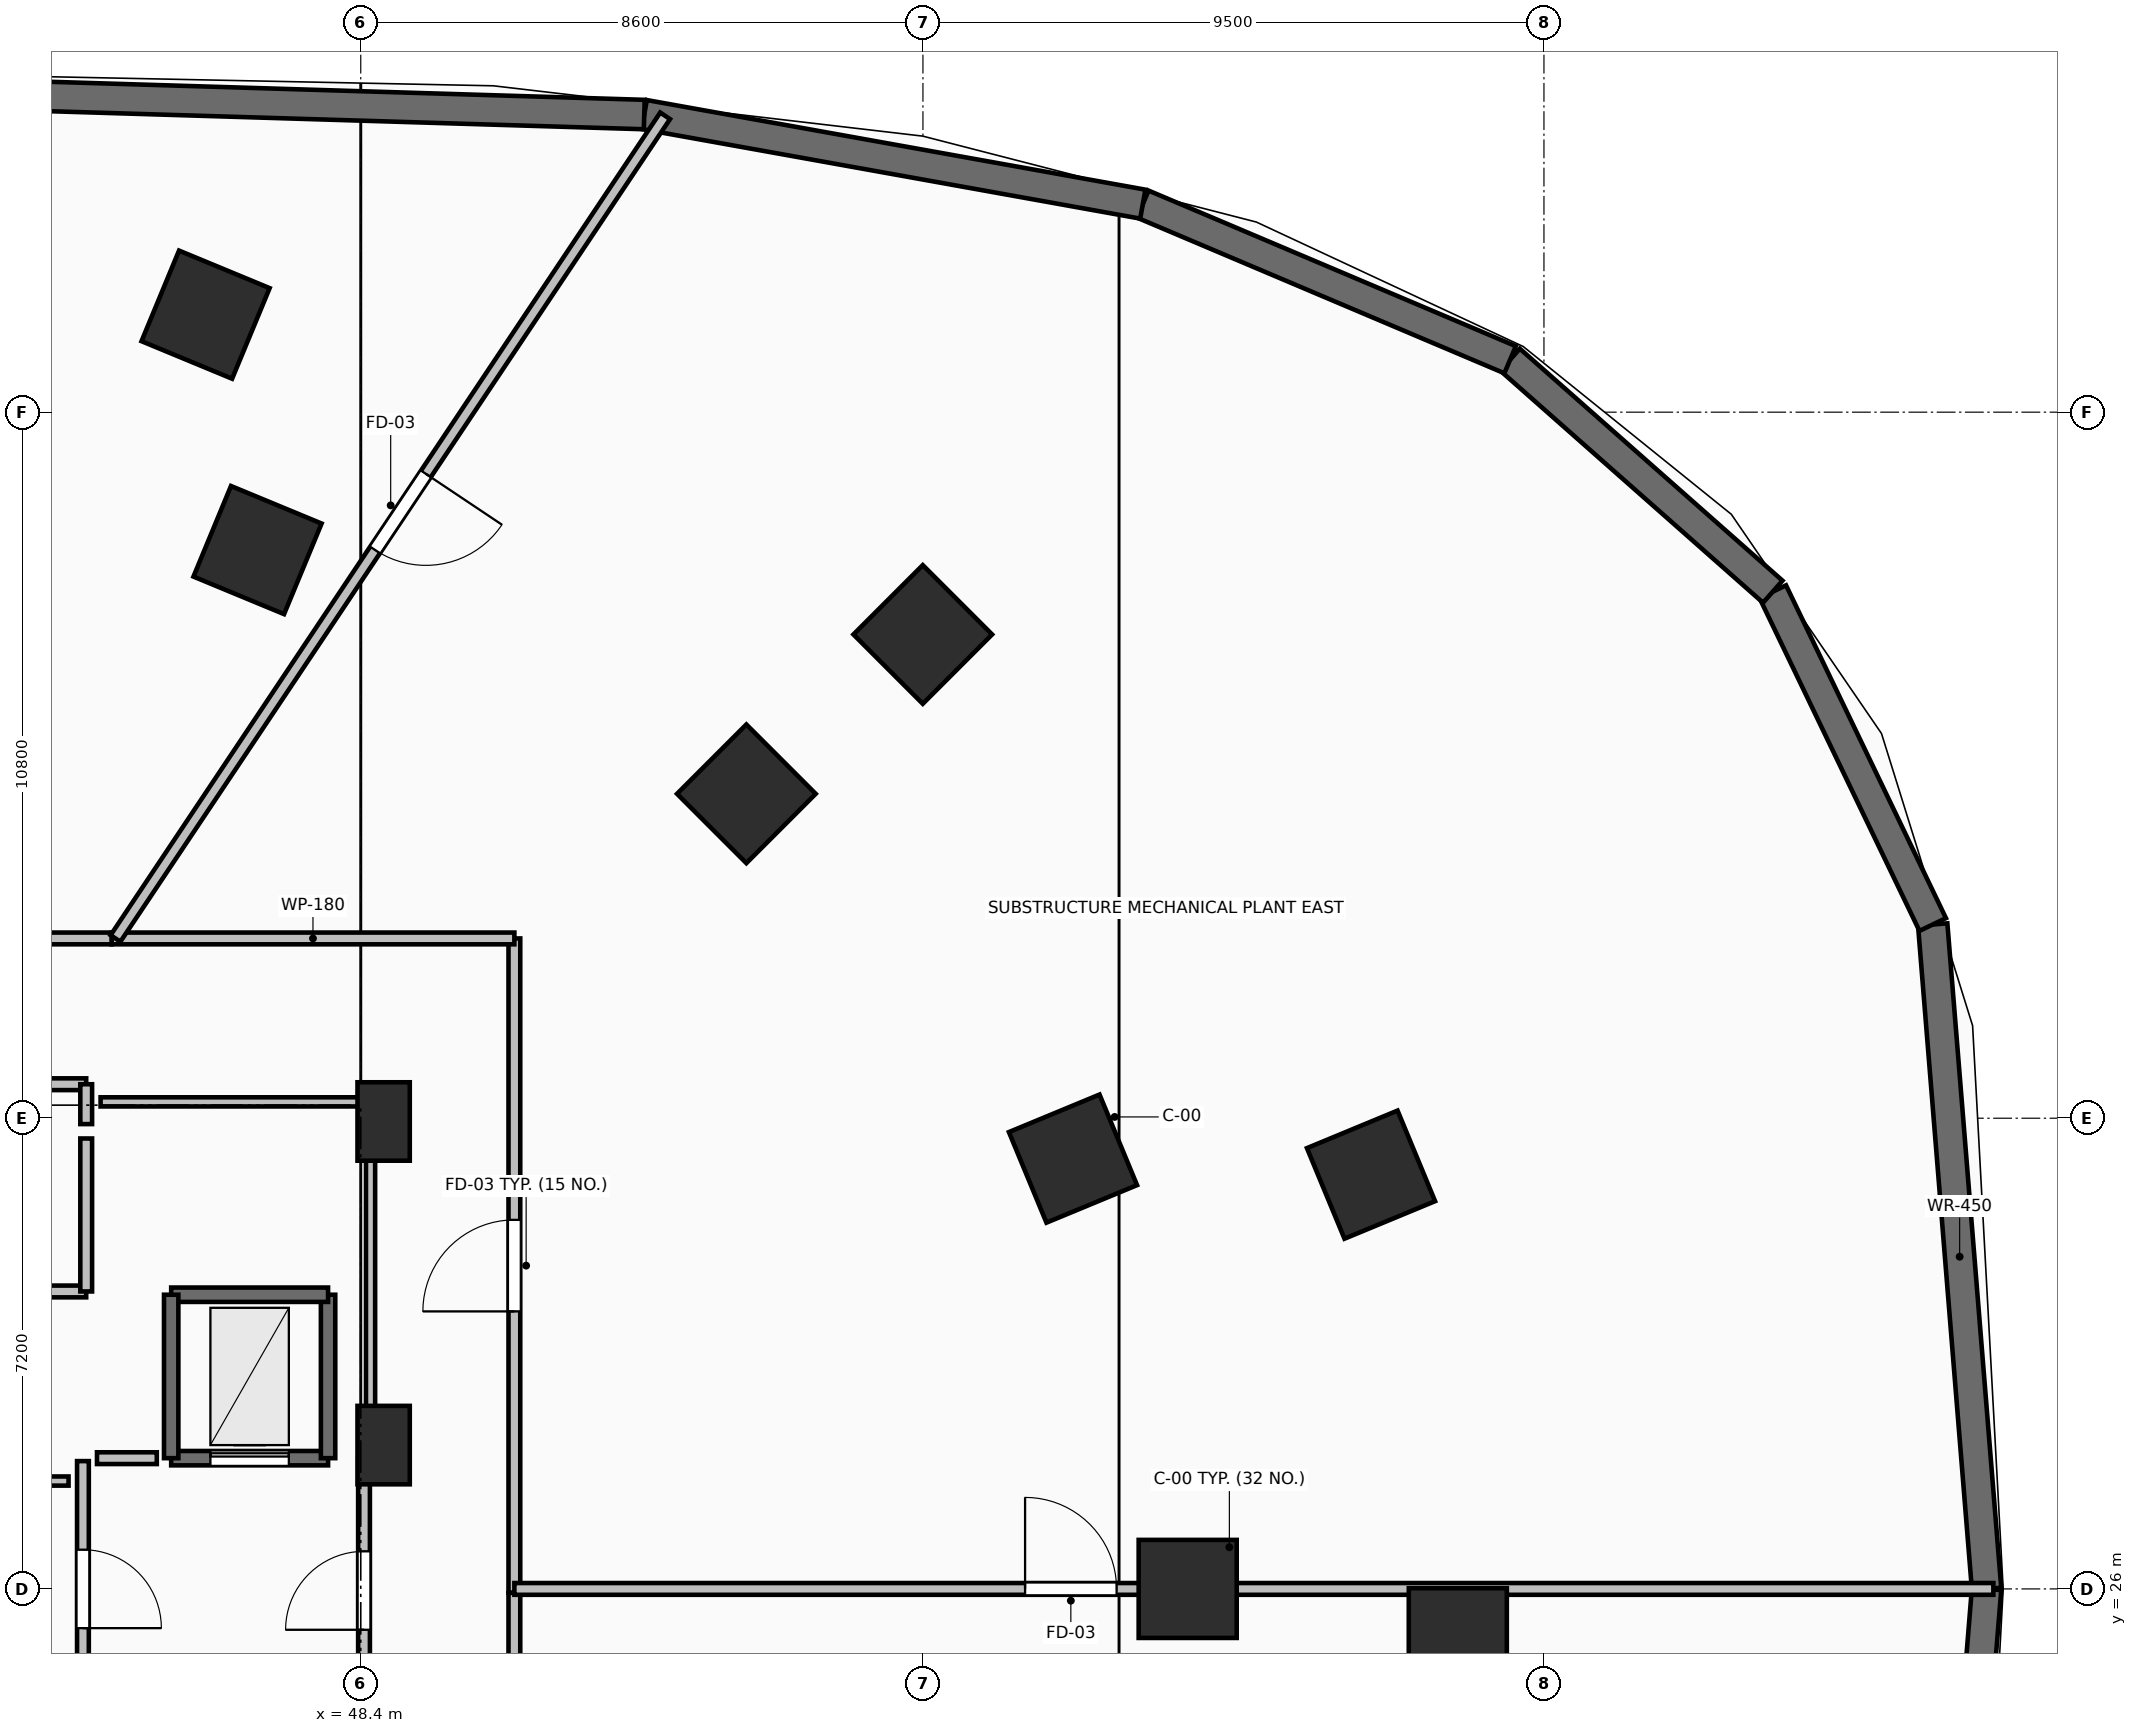
"""IFC4 building model, lengths in metres.
Left out: names, types, materials, properties, quantities, classifications, styles, units other than length and angle.
Written with IfcOpenShell. Run it as: python <this file> out.ifc"""

import sys

from ifc_helpers import new_model, si_unit, direction, frame, frame_2d, origin, origin_2d, place, context, subcontext, project, spatial, rectangle, extrude, element, fill, save


model = new_model("IFC4")
c1 = context("Model", 3, precision=1e-05, world=origin(), true_north=direction((0.0, 1.0)))
c2 = subcontext(c1, "Body", "Model", "MODEL_VIEW")
j1 = project(units=[si_unit("LENGTHUNIT", "METRE"), si_unit("PLANEANGLEUNIT", "RADIAN")], contexts=[c1])
p1 = place(None, origin())
s1 = spatial("IfcSite", under=j1, at=p1, CompositionType="ELEMENT")
p2 = place(p1, origin())
s2 = spatial("IfcBuilding", under=s1, at=p2, CompositionType="ELEMENT")
p3 = place(p2, frame((0.0, 0.0, -9.6)))
s3 = spatial("IfcBuildingStorey", under=s2, at=p3, CompositionType="ELEMENT", Elevation=-9.6)
for number, where, z_axis, x_axis in (
    (1, (61.05, 26.0, 0.0), (0.0, 0.0, 1.0), (1.0, 0.0, 0.0)),
    (2, (59.295, 32.582, 0.0), (0.0, 0.0, 1.0), (0.924, 0.383, 0.0)),
    (3, (54.299, 38.162, 0.0), (0.0, 0.0, 1.0), (0.707, 0.707, 0.0)),
    (4, (46.821, 41.891, 0.0), (0.0, 0.0, 1.0), (0.383, 0.924, 0.0)),
    (5, (65.182, 25.261, 0.0), (0.0, 0.0, 1.0), (1.0, 0.0, 0.0)),
    (6, (63.854, 32.337, 0.0), (0.0, 0.0, 1.0), (0.924, 0.383, 0.0)),
    (7, (56.997, 40.6, 0.0), (0.0, 0.0, 1.0), (0.707, 0.707, 0.0)),
    (8, (46.026, 45.492, 0.0), (0.0, 0.0, 1.0), (0.383, 0.924, 0.0)),
):
    element("IfcColumn", number, at=place(p3, frame(where, z_axis=z_axis, x_axis=x_axis)), inside=s3, PredefinedType="COLUMN", context=c2, shape_type="SweptSolid", body=[
        extrude(rectangle(XDim=1.5, YDim=1.5, at=origin_2d()), origin(), (0.0, 0.0, 1.0), 4.8),
    ])
for number, where, z_axis, x_axis in (
    (9, (48.75, 33.15, 0.0), (0.0, 0.0, 1.0), (1.0, 0.0, 0.0)),
    (10, (48.75, 28.2, 0.0), (0.0, 0.0, 1.0), (1.0, 0.0, 0.0)),
):
    element("IfcColumn", number, at=place(p3, frame(where, z_axis=z_axis, x_axis=x_axis)), inside=s3, PredefinedType="PILASTER", context=c2, shape_type="SweptSolid", body=[
        extrude(rectangle(XDim=0.8, YDim=1.2, at=origin_2d()), origin(), (0.0, 0.0, 1.0), 4.8),
    ])
p4 = place(p3, frame((73.271, 26.0, 0.0), z_axis=(0.0, 0.0, 1.0), x_axis=(-0.080835799126, 0.996727431939, 0.0)))
e11 = element("IfcWall", 11, at=p4, inside=s3, PredefinedType="SOLIDWALL", context=c2, shape_type="SweptSolid", body=[
    extrude(rectangle(XDim=10.196, YDim=0.45, at=frame_2d((5.098, 0.0))), origin(), (0.0, 0.0, 1.0), 4.45),
])
p5 = place(p3, frame((72.447, 36.163, 0.0), z_axis=(0.0, 0.0, 1.0), x_axis=(-0.433120243411, 0.901336149695, 0.0)))
e12 = element("IfcWall", 12, at=p5, inside=s3, PredefinedType="SOLIDWALL", context=c2, shape_type="SweptSolid", body=[
    extrude(rectangle(XDim=5.649, YDim=0.45, at=frame_2d((2.824, 0.0))), origin(), (0.0, 0.0, 1.0), 4.45),
])
p6 = place(p3, frame((70.0, 41.254, 0.0), z_axis=(0.0, 0.0, 1.0), x_axis=(-0.749561336725, 0.661934892937, 0.0)))
e13 = element("IfcWall", 13, at=p6, inside=s3, PredefinedType="SOLIDWALL", context=c2, shape_type="SweptSolid", body=[
    extrude(rectangle(XDim=5.361, YDim=0.45, at=frame_2d((2.68, 0.0))), origin(), (0.0, 0.0, 1.0), 4.45),
])
p7 = place(p3, frame((65.982, 44.802, 0.0), z_axis=(0.0, 0.0, 1.0), x_axis=(-0.92081090532, 0.390009328919, 0.0)))
e14 = element("IfcWall", 14, at=p7, inside=s3, PredefinedType="SOLIDWALL", context=c2, shape_type="SweptSolid", body=[
    extrude(rectangle(XDim=6.102, YDim=0.45, at=frame_2d((3.051, 0.0))), origin(), (0.0, 0.0, 1.0), 4.45),
])
p8 = place(p3, frame((60.364, 47.182, 0.0), z_axis=(0.0, 0.0, 1.0), x_axis=(-0.984238318617, 0.176847200051, 0.0)))
e15 = element("IfcWall", 15, at=p8, inside=s3, PredefinedType="SOLIDWALL", context=c2, shape_type="SweptSolid", body=[
    extrude(rectangle(XDim=7.749, YDim=0.45, at=frame_2d((3.875, 0.0))), origin(), (0.0, 0.0, 1.0), 4.45),
])
p9 = place(p3, frame((52.737, 48.553, 0.0), z_axis=(0.0, 0.0, 1.0), x_axis=(-0.999540251976, 0.030319707786, 0.0)))
e16 = element("IfcWall", 16, at=p9, inside=s3, PredefinedType="SOLIDWALL", context=c2, shape_type="SweptSolid", body=[
    extrude(rectangle(XDim=14.744, YDim=0.45, at=frame_2d((7.372, 0.0))), origin(), (0.0, 0.0, 1.0), 4.45),
])
p10 = place(p3, frame((72.447, 15.837, 0.0), z_axis=(0.0, 0.0, 1.0), x_axis=(0.080835799126, 0.996727431939, 0.0)))
e17 = element("IfcWall", 17, at=p10, inside=s3, PredefinedType="SOLIDWALL", context=c2, shape_type="SweptSolid", body=[
    extrude(rectangle(XDim=10.196, YDim=0.45, at=frame_2d((5.098, 0.0))), origin(), (0.0, 0.0, 1.0), 4.45),
])
p11 = place(p3, frame((45.5, 28.0, 0.0), z_axis=(0.0, 0.0, 1.0), x_axis=(1.0, 0.0, 0.0)))
e18 = element("IfcWall", 18, at=p11, inside=s3, PredefinedType="SHEAR", context=c2, shape_type="SweptSolid", body=[
    extrude(rectangle(XDim=2.4, YDim=0.22, at=frame_2d((1.2, 0.0))), origin(), (0.0, 0.0, 1.0), 4.45),
])
p12 = place(p11, frame((0.6, 0.0, 0.0)))
e19 = element("IfcOpeningElement", 19, at=p12, cuts=e18, PredefinedType="OPENING", context=c2, shape_type="SweptSolid", body=[
    extrude(rectangle(XDim=1.2, YDim=2.2, at=frame_2d((0.6, 1.1))), frame((0.0, 0.125, 0.0), z_axis=(0.0, -1.0, 0.0), x_axis=(1.0, 0.0, 0.0)), (0.0, 0.0, 1.0), 0.25),
])
p13 = place(p3, frame((47.9, 28.0, 0.0), z_axis=(0.0, 0.0, 1.0), x_axis=(0.0, 1.0, 0.0)))
e20 = element("IfcWall", 20, at=p13, inside=s3, PredefinedType="SHEAR", context=c2, shape_type="SweptSolid", body=[
    extrude(rectangle(XDim=2.5, YDim=0.22, at=frame_2d((1.25, 0.0))), origin(), (0.0, 0.0, 1.0), 4.45),
])
p14 = place(p3, frame((47.9, 30.5, 0.0), z_axis=(0.0, 0.0, 1.0), x_axis=(-1.0, 0.0, 0.0)))
e21 = element("IfcWall", 21, at=p14, inside=s3, PredefinedType="SHEAR", context=c2, shape_type="SweptSolid", body=[
    extrude(rectangle(XDim=2.4, YDim=0.22, at=frame_2d((1.2, 0.0))), origin(), (0.0, 0.0, 1.0), 4.45),
])
p15 = place(p3, frame((45.5, 30.5, 0.0), z_axis=(0.0, 0.0, 1.0), x_axis=(0.0, -1.0, 0.0)))
e22 = element("IfcWall", 22, at=p15, inside=s3, PredefinedType="SHEAR", context=c2, shape_type="SweptSolid", body=[
    extrude(rectangle(XDim=2.5, YDim=0.22, at=frame_2d((1.25, 0.0))), origin(), (0.0, 0.0, 1.0), 4.45),
])
p16 = place(p3, frame((44.15, 27.955, 0.0), z_axis=(0.0, 0.0, 1.0), x_axis=(0.0, -1.0, 0.0)))
e23 = element("IfcWall", 23, at=p16, inside=s3, PredefinedType="PARTITIONING", context=c2, shape_type="SweptSolid", body=[
    extrude(rectangle(XDim=3.91, YDim=0.18, at=frame_2d((1.955, 0.0))), origin(), (0.0, 0.0, 1.0), 4.45),
])
p17 = place(p16, frame((1.355, 0.0, 0.0)))
e24 = element("IfcOpeningElement", 24, at=p17, cuts=e23, PredefinedType="OPENING", context=c2, shape_type="SweptSolid", body=[
    extrude(rectangle(XDim=1.2, YDim=2.15, at=frame_2d((0.6, 1.075))), frame((0.0, 0.105, 0.0), z_axis=(0.0, -1.0, 0.0), x_axis=(1.0, 0.0, 0.0)), (0.0, 0.0, 1.0), 0.21),
])
p18 = place(p3, frame((48.45, 23.95, 0.0), z_axis=(0.0, 0.0, 1.0), x_axis=(0.0, 1.0, 0.0)))
e25 = element("IfcWall", 25, at=p18, inside=s3, PredefinedType="PARTITIONING", context=c2, shape_type="SweptSolid", body=[
    extrude(rectangle(XDim=4.05, YDim=0.18, at=frame_2d((2.025, 0.0))), origin(), (0.0, 0.0, 1.0), 3.03),
])
p19 = place(p18, frame((1.425, 0.0, 0.0)))
e26 = element("IfcOpeningElement", 26, at=p19, cuts=e25, PredefinedType="OPENING", context=c2, shape_type="SweptSolid", body=[
    extrude(rectangle(XDim=1.2, YDim=2.15, at=frame_2d((0.6, 1.075))), frame((0.0, 0.105, 0.0), z_axis=(0.0, -1.0, 0.0), x_axis=(1.0, 0.0, 0.0)), (0.0, 0.0, 1.0), 0.21),
])
p20 = place(p3, frame((44.2, 33.72, 0.0), z_axis=(0.0, 0.0, 1.0), x_axis=(-1.0, 0.0, 0.0)))
e27 = element("IfcWall", 27, at=p20, inside=s3, PredefinedType="PARTITIONING", context=c2, shape_type="SweptSolid", body=[
    extrude(rectangle(XDim=5.25, YDim=0.18, at=frame_2d((2.625, 0.0))), origin(), (0.0, 0.0, 1.0), 4.45),
])
p21 = place(p20, frame((1.925, 0.0, 0.0)))
e28 = element("IfcOpeningElement", 28, at=p21, cuts=e27, PredefinedType="OPENING", context=c2, shape_type="SweptSolid", body=[
    extrude(rectangle(XDim=1.4, YDim=2.2, at=frame_2d((0.7, 1.1))), frame((0.0, 0.105, 0.0), z_axis=(0.0, -1.0, 0.0), x_axis=(1.0, 0.0, 0.0)), (0.0, 0.0, 1.0), 0.21),
])
p22 = place(p3, frame((44.2, 33.11, 0.0), z_axis=(0.0, 0.0, 1.0), x_axis=(0.0, 1.0, 0.0)))
e29 = element("IfcWall", 29, at=p22, inside=s3, PredefinedType="PARTITIONING", context=c2, shape_type="SweptSolid", body=[
    extrude(rectangle(XDim=0.61, YDim=0.18, at=frame_2d((0.305, 0.0))), origin(), (0.0, 0.0, 1.0), 4.45),
])
p23 = place(p3, frame((50.75, 25.94, 0.0), z_axis=(0.0, 0.0, 1.0), x_axis=(0.0, 1.0, 0.0)))
e30 = element("IfcWall", 30, at=p23, inside=s3, PredefinedType="PARTITIONING", context=c2, shape_type="SweptSolid", body=[
    extrude(rectangle(XDim=10.01, YDim=0.18, at=frame_2d((5.005, 0.0))), origin(), (0.0, 0.0, 1.0), 3.642),
])
p24 = place(p23, frame((4.305, 0.0, 0.0)))
e31 = element("IfcOpeningElement", 31, at=p24, cuts=e30, PredefinedType="OPENING", context=c2, shape_type="SweptSolid", body=[
    extrude(rectangle(XDim=1.4, YDim=2.2, at=frame_2d((0.7, 1.1))), frame((0.0, 0.105, 0.0), z_axis=(0.0, -1.0, 0.0), x_axis=(1.0, 0.0, 0.0)), (0.0, 0.0, 1.0), 0.21),
])
p25 = place(p3, frame((50.75, 35.95, 0.0), z_axis=(0.0, 0.0, 1.0), x_axis=(-1.0, 0.0, 0.0)))
e32 = element("IfcWall", 32, at=p25, inside=s3, PredefinedType="PARTITIONING", context=c2, shape_type="SweptSolid", body=[
    extrude(rectangle(XDim=6.162, YDim=0.18, at=frame_2d((3.081, 0.0))), origin(), (0.0, 0.0, 1.0), 3.642),
])
p26 = place(p3, frame((44.588, 35.95, 0.0), z_axis=(0.0, 0.0, 1.0), x_axis=(-1.0, 0.0, 0.0)))
e33 = element("IfcWall", 33, at=p26, inside=s3, PredefinedType="PARTITIONING", context=c2, shape_type="SweptSolid", body=[
    extrude(rectangle(XDim=19.338, YDim=0.18, at=frame_2d((9.669, 0.0))), origin(), (0.0, 0.0, 1.0), 3.642),
])
p27 = place(p26, frame((7.289, 0.0, 0.0)))
e34 = element("IfcOpeningElement", 34, at=p27, cuts=e33, PredefinedType="OPENING", context=c2, shape_type="SweptSolid", body=[
    extrude(rectangle(XDim=1.4, YDim=2.2, at=frame_2d((0.7, 1.1))), frame((0.0, 0.105, 0.0), z_axis=(0.0, -1.0, 0.0), x_axis=(1.0, 0.0, 0.0)), (0.0, 0.0, 1.0), 0.21),
])
p28 = place(p3, frame((50.75, 14.1, 0.0), z_axis=(0.0, 0.0, 1.0), x_axis=(0.0, 1.0, 0.0)))
e35 = element("IfcWall", 35, at=p28, inside=s3, PredefinedType="PARTITIONING", context=c2, shape_type="SweptSolid", body=[
    extrude(rectangle(XDim=11.84, YDim=0.18, at=frame_2d((5.92, 0.0))), origin(), (0.0, 0.0, 1.0), 3.642),
])
p29 = place(p28, frame((5.22, 0.0, 0.0)))
e36 = element("IfcOpeningElement", 36, at=p29, cuts=e35, PredefinedType="OPENING", context=c2, shape_type="SweptSolid", body=[
    extrude(rectangle(XDim=1.4, YDim=2.2, at=frame_2d((0.7, 1.1))), frame((0.0, 0.105, 0.0), z_axis=(0.0, -1.0, 0.0), x_axis=(1.0, 0.0, 0.0)), (0.0, 0.0, 1.0), 0.21),
])
p30 = place(p3, frame((53.056, 48.533, 0.0), z_axis=(0.0, 0.0, 1.0), x_axis=(-0.555582200118, -0.831461616019, 0.0)))
e37 = element("IfcWall", 37, at=p30, inside=s3, PredefinedType="PARTITIONING", context=c2, shape_type="SweptSolid", body=[
    extrude(rectangle(XDim=15.134, YDim=0.18, at=frame_2d((7.567, 0.0))), origin(), (0.0, 0.0, 1.0), 3.642),
])
p31 = place(p30, frame((6.587, 0.0, 0.0)))
e38 = element("IfcOpeningElement", 38, at=p31, cuts=e37, PredefinedType="OPENING", context=c2, shape_type="SweptSolid", body=[
    extrude(rectangle(XDim=1.4, YDim=2.2, at=frame_2d((0.7, 1.1))), frame((0.0, 0.105, 0.0), z_axis=(0.0, -1.0, 0.0), x_axis=(1.0, 0.0, 0.0)), (0.0, 0.0, 1.0), 0.21),
])
p32 = place(p3, frame((50.75, 26.0, 0.0), z_axis=(0.0, 0.0, 1.0), x_axis=(1.0, 0.0, 0.0)))
e39 = element("IfcWall", 39, at=p32, inside=s3, PredefinedType="PARTITIONING", context=c2, shape_type="SweptSolid", body=[
    extrude(rectangle(XDim=22.625, YDim=0.18, at=frame_2d((11.312, 0.0))), origin(), (0.0, 0.0, 1.0), 3.642),
])
p33 = place(p32, frame((7.812, 0.0, 0.0)))
e40 = element("IfcOpeningElement", 40, at=p33, cuts=e39, PredefinedType="OPENING", context=c2, shape_type="SweptSolid", body=[
    extrude(rectangle(XDim=1.4, YDim=2.2, at=frame_2d((0.7, 1.1))), frame((0.0, 0.105, 0.0), z_axis=(0.0, -1.0, 0.0), x_axis=(1.0, 0.0, 0.0)), (0.0, 0.0, 1.0), 0.21),
])
p34 = place(p3, frame((45.28, 28.0, 0.0), z_axis=(0.0, 0.0, 1.0), x_axis=(-1.0, 0.0, 0.0)))
e41 = element("IfcWall", 41, at=p34, inside=s3, PredefinedType="PARTITIONING", context=c2, shape_type="SweptSolid", body=[
    extrude(rectangle(XDim=0.915, YDim=0.18, at=frame_2d((0.458, 0.0))), origin(), (0.0, 0.0, 1.0), 4.45),
])
p35 = place(p3, frame((43.93, 27.65, 0.0), z_axis=(0.0, 0.0, 1.0), x_axis=(-1.0, 0.0, 0.0)))
e42 = element("IfcWall", 42, at=p35, inside=s3, PredefinedType="PARTITIONING", context=c2, shape_type="SweptSolid", body=[
    extrude(rectangle(XDim=11.86, YDim=0.14, at=frame_2d((5.93, 0.0))), origin(), (0.0, 0.0, 1.0), 4.45),
])
p36 = place(p3, frame((39.03, 30.55, 0.0), z_axis=(0.0, 0.0, 1.0), x_axis=(1.0, 0.0, 0.0)))
e43 = element("IfcWall", 43, at=p36, inside=s3, PredefinedType="PARTITIONING", context=c2, shape_type="SweptSolid", body=[
    extrude(rectangle(XDim=5.17, YDim=0.18, at=frame_2d((2.585, 0.0))), origin(), (0.0, 0.0, 1.0), 3.03),
])
p37 = place(p3, frame((44.2, 30.55, 0.0), z_axis=(0.0, 0.0, 1.0), x_axis=(0.0, 1.0, 0.0)))
e44 = element("IfcWall", 44, at=p37, inside=s3, PredefinedType="PARTITIONING", context=c2, shape_type="SweptSolid", body=[
    extrude(rectangle(XDim=2.34, YDim=0.18, at=frame_2d((1.17, 0.0))), origin(), (0.0, 0.0, 1.0), 4.45),
])
p38 = place(p3, frame((44.42, 33.45, 0.0), z_axis=(0.0, 0.0, 1.0), x_axis=(1.0, 0.0, 0.0)))
e45 = element("IfcWall", 45, at=p38, inside=s3, PredefinedType="PARTITIONING", context=c2, shape_type="SweptSolid", body=[
    extrude(rectangle(XDim=4.13, YDim=0.14, at=frame_2d((2.065, 0.0))), origin(), (0.0, 0.0, 1.0), 3.642),
])
p39 = place(p3, frame((48.55, 33.45, 0.0), z_axis=(0.0, 0.0, 1.0), x_axis=(0.0, -1.0, 0.0)))
e46 = element("IfcWall", 46, at=p39, inside=s3, PredefinedType="PARTITIONING", context=c2, shape_type="SweptSolid", body=[
    extrude(rectangle(XDim=5.254, YDim=0.14, at=frame_2d((2.627, 0.0))), origin(), (0.0, 0.0, 1.0), 3.03),
])
p40 = place(p12, origin())
e47 = element("IfcDoor", 47, at=p40, inside=s3, OperationType="SLIDING_TO_LEFT", PredefinedType="DOOR", context=c2, shape_type="SweptSolid", body=[
    extrude(rectangle(XDim=1.2, YDim=2.2, at=frame_2d((0.6, 1.1))), frame((0.0, 0.025, 0.0), z_axis=(0.0, -1.0, 0.0), x_axis=(1.0, 0.0, 0.0)), (0.0, 0.0, 1.0), 0.05),
])
fill(e19, e47)
p41 = place(p17, origin())
e48 = element("IfcDoor", 48, at=p41, inside=s3, OperationType="SINGLE_SWING_RIGHT", PredefinedType="DOOR", context=c2, shape_type="SweptSolid", body=[
    extrude(rectangle(XDim=1.2, YDim=2.15, at=frame_2d((0.6, 1.075))), frame((0.0, 0.025, 0.0), z_axis=(0.0, -1.0, 0.0), x_axis=(1.0, 0.0, 0.0)), (0.0, 0.0, 1.0), 0.05),
])
fill(e24, e48)
p42 = place(p19, origin())
e49 = element("IfcDoor", 49, at=p42, inside=s3, OperationType="SINGLE_SWING_LEFT", PredefinedType="DOOR", context=c2, shape_type="SweptSolid", body=[
    extrude(rectangle(XDim=1.2, YDim=2.15, at=frame_2d((0.6, 1.075))), frame((0.0, 0.025, 0.0), z_axis=(0.0, -1.0, 0.0), x_axis=(1.0, 0.0, 0.0)), (0.0, 0.0, 1.0), 0.05),
])
fill(e26, e49)
p43 = place(p24, origin())
e50 = element("IfcDoor", 50, at=p43, inside=s3, OperationType="DOUBLE_SWING_LEFT", PredefinedType="DOOR", context=c2, shape_type="SweptSolid", body=[
    extrude(rectangle(XDim=1.4, YDim=2.2, at=frame_2d((0.7, 1.1))), frame((0.0, 0.025, 0.0), z_axis=(0.0, -1.0, 0.0), x_axis=(1.0, 0.0, 0.0)), (0.0, 0.0, 1.0), 0.05),
])
fill(e31, e50)
p44 = place(p31, origin())
e51 = element("IfcDoor", 51, at=p44, inside=s3, OperationType="DOUBLE_SWING_LEFT", PredefinedType="DOOR", context=c2, shape_type="SweptSolid", body=[
    extrude(rectangle(XDim=1.4, YDim=2.2, at=frame_2d((0.7, 1.1))), frame((0.0, 0.025, 0.0), z_axis=(0.0, -1.0, 0.0), x_axis=(1.0, 0.0, 0.0)), (0.0, 0.0, 1.0), 0.05),
])
fill(e38, e51)
p45 = place(p33, origin())
e52 = element("IfcDoor", 52, at=p45, inside=s3, OperationType="DOUBLE_SWING_LEFT", PredefinedType="DOOR", context=c2, shape_type="SweptSolid", body=[
    extrude(rectangle(XDim=1.4, YDim=2.2, at=frame_2d((0.7, 1.1))), frame((0.0, 0.025, 0.0), z_axis=(0.0, -1.0, 0.0), x_axis=(1.0, 0.0, 0.0)), (0.0, 0.0, 1.0), 0.05),
])
fill(e40, e52)
save(model, sys.argv[1])
